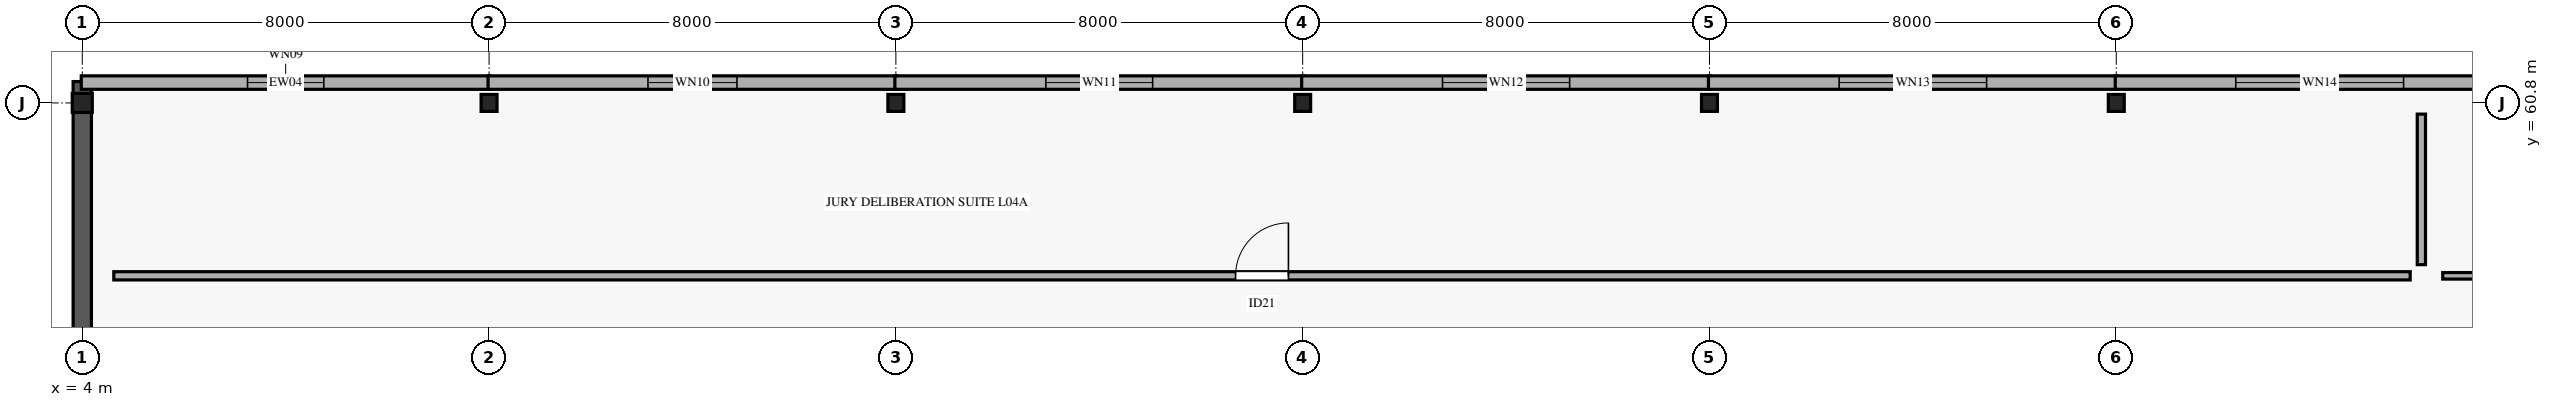
"""IFC4 building model, lengths in metres.
Left out: names, types, materials, properties, quantities, classifications, styles, units other than length and angle.
Written with IfcOpenShell. Run it as: python <this file> out.ifc"""

import sys

from ifc_helpers import new_model, si_unit, direction, frame, frame_2d, origin, origin_2d, place, context, subcontext, project, spatial, rectangle, i_section, extrude, element, fill, save


model = new_model("IFC4")
c1 = context("Model", 3, precision=1e-05, world=origin(), true_north=direction((0.0, 1.0)))
c2 = subcontext(c1, "Body", "Model", "MODEL_VIEW")
j1 = project(units=[si_unit("LENGTHUNIT", "METRE"), si_unit("PLANEANGLEUNIT", "RADIAN")], contexts=[c1])
p1 = place(None, origin())
s1 = spatial("IfcSite", under=j1, at=p1, CompositionType="ELEMENT")
p2 = place(p1, origin())
s2 = spatial("IfcBuilding", under=s1, at=p2, CompositionType="ELEMENT")
p3 = place(p2, frame((0.0, 0.0, 20.4)))
s3 = spatial("IfcBuildingStorey", under=s2, at=p3, CompositionType="ELEMENT", Elevation=20.4)
p4 = place(p3, frame((4.0, 60.8, 0.0), z_axis=(0.0, 0.0, 1.0), x_axis=(1.0, 0.0, 0.0)))
e1 = element("IfcColumn", 1, at=p4, inside=s3, PredefinedType="COLUMN", context=c2, shape_type="SweptSolid", body=[
    extrude(i_section(OverallWidth=0.394, OverallDepth=0.376, WebThickness=0.017, FlangeThickness=0.028, FilletRadius=0.015, at=origin_2d()), origin(), (0.0, 0.0, 1.0), 4.595),
])
for number, where, z_axis, x_axis in (
    (2, (12.0, 60.8, 0.0), (0.0, 0.0, 1.0), (1.0, 0.0, 0.0)),
    (3, (20.0, 60.8, 0.0), (0.0, 0.0, 1.0), (1.0, 0.0, 0.0)),
    (4, (28.0, 60.8, 0.0), (0.0, 0.0, 1.0), (1.0, 0.0, 0.0)),
    (5, (36.0, 60.8, 0.0), (0.0, 0.0, 1.0), (1.0, 0.0, 0.0)),
    (6, (44.0, 60.8, 0.0), (0.0, 0.0, 1.0), (1.0, 0.0, 0.0)),
):
    element("IfcColumn", number, at=place(p3, frame(where, z_axis=z_axis, x_axis=x_axis)), inside=s3, PredefinedType="COLUMN", context=c2, shape_type="SweptSolid", body=[
        extrude(i_section(OverallWidth=0.313, OverallDepth=0.333, WebThickness=0.018, FlangeThickness=0.028, FilletRadius=0.015, at=origin_2d()), origin(), (0.0, 0.0, 1.0), 4.595),
    ])
p5 = place(p3, frame((4.0, 53.18, 0.0), z_axis=(0.0, 0.0, 1.0), x_axis=(0.0, 1.0, 0.0)))
e7 = element("IfcWall", 7, at=p5, inside=s3, PredefinedType="STANDARD", context=c2, shape_type="SweptSolid", body=[
    extrude(rectangle(XDim=8.04, YDim=0.36, at=frame_2d((4.02, 0.0))), origin(), (0.0, 0.0, 1.0), 4.6),
])
p6 = place(p3, frame((3.98, 61.2, 0.0), z_axis=(0.0, 0.0, 1.0), x_axis=(1.0, 0.0, 0.0)))
e8 = element("IfcWall", 8, at=p6, inside=s3, PredefinedType="STANDARD", context=c2, shape_type="SweptSolid", body=[
    extrude(rectangle(XDim=8.04, YDim=0.265, at=frame_2d((4.02, 0.0))), origin(), (0.0, 0.0, 1.0), 3.66),
])
p7 = place(p6, frame((3.27, 0.0, 0.75)))
e9 = element("IfcOpeningElement", 9, at=p7, cuts=e8, PredefinedType="OPENING", context=c2, shape_type="SweptSolid", body=[
    extrude(rectangle(XDim=1.5, YDim=2.15, at=frame_2d((0.75, 1.075))), frame((0.0, 0.142, 0.0), z_axis=(0.0, -1.0, 0.0), x_axis=(1.0, 0.0, 0.0)), (0.0, 0.0, 1.0), 0.285),
])
p8 = place(p3, frame((11.98, 61.2, 0.0), z_axis=(0.0, 0.0, 1.0), x_axis=(1.0, 0.0, 0.0)))
e10 = element("IfcWall", 10, at=p8, inside=s3, PredefinedType="STANDARD", context=c2, shape_type="SweptSolid", body=[
    extrude(rectangle(XDim=8.04, YDim=0.265, at=frame_2d((4.02, 0.0))), origin(), (0.0, 0.0, 1.0), 3.66),
])
p9 = place(p8, frame((3.145, 0.0, 0.75)))
e11 = element("IfcOpeningElement", 11, at=p9, cuts=e10, PredefinedType="OPENING", context=c2, shape_type="SweptSolid", body=[
    extrude(rectangle(XDim=1.75, YDim=2.15, at=frame_2d((0.875, 1.075))), frame((0.0, 0.142, 0.0), z_axis=(0.0, -1.0, 0.0), x_axis=(1.0, 0.0, 0.0)), (0.0, 0.0, 1.0), 0.285),
])
p10 = place(p3, frame((19.98, 61.2, 0.0), z_axis=(0.0, 0.0, 1.0), x_axis=(1.0, 0.0, 0.0)))
e12 = element("IfcWall", 12, at=p10, inside=s3, PredefinedType="STANDARD", context=c2, shape_type="SweptSolid", body=[
    extrude(rectangle(XDim=8.04, YDim=0.265, at=frame_2d((4.02, 0.0))), origin(), (0.0, 0.0, 1.0), 3.66),
])
p11 = place(p10, frame((2.97, 0.0, 0.75)))
e13 = element("IfcOpeningElement", 13, at=p11, cuts=e12, PredefinedType="OPENING", context=c2, shape_type="SweptSolid", body=[
    extrude(rectangle(XDim=2.1, YDim=2.15, at=frame_2d((1.05, 1.075))), frame((0.0, 0.142, 0.0), z_axis=(0.0, -1.0, 0.0), x_axis=(1.0, 0.0, 0.0)), (0.0, 0.0, 1.0), 0.285),
])
p12 = place(p3, frame((27.98, 61.2, 0.0), z_axis=(0.0, 0.0, 1.0), x_axis=(1.0, 0.0, 0.0)))
e14 = element("IfcWall", 14, at=p12, inside=s3, PredefinedType="STANDARD", context=c2, shape_type="SweptSolid", body=[
    extrude(rectangle(XDim=8.04, YDim=0.265, at=frame_2d((4.02, 0.0))), origin(), (0.0, 0.0, 1.0), 3.66),
])
p13 = place(p12, frame((2.77, 0.0, 0.75)))
e15 = element("IfcOpeningElement", 15, at=p13, cuts=e14, PredefinedType="OPENING", context=c2, shape_type="SweptSolid", body=[
    extrude(rectangle(XDim=2.5, YDim=2.15, at=frame_2d((1.25, 1.075))), frame((0.0, 0.142, 0.0), z_axis=(0.0, -1.0, 0.0), x_axis=(1.0, 0.0, 0.0)), (0.0, 0.0, 1.0), 0.285),
])
p14 = place(p3, frame((35.98, 61.2, 0.0), z_axis=(0.0, 0.0, 1.0), x_axis=(1.0, 0.0, 0.0)))
e16 = element("IfcWall", 16, at=p14, inside=s3, PredefinedType="STANDARD", context=c2, shape_type="SweptSolid", body=[
    extrude(rectangle(XDim=8.04, YDim=0.265, at=frame_2d((4.02, 0.0))), origin(), (0.0, 0.0, 1.0), 3.66),
])
p15 = place(p14, frame((2.57, 0.0, 0.75)))
e17 = element("IfcOpeningElement", 17, at=p15, cuts=e16, PredefinedType="OPENING", context=c2, shape_type="SweptSolid", body=[
    extrude(rectangle(XDim=2.9, YDim=2.15, at=frame_2d((1.45, 1.075))), frame((0.0, 0.142, 0.0), z_axis=(0.0, -1.0, 0.0), x_axis=(1.0, 0.0, 0.0)), (0.0, 0.0, 1.0), 0.285),
])
p16 = place(p3, frame((43.98, 61.2, 0.0), z_axis=(0.0, 0.0, 1.0), x_axis=(1.0, 0.0, 0.0)))
e18 = element("IfcWall", 18, at=p16, inside=s3, PredefinedType="STANDARD", context=c2, shape_type="SweptSolid", body=[
    extrude(rectangle(XDim=8.04, YDim=0.265, at=frame_2d((4.02, 0.0))), origin(), (0.0, 0.0, 1.0), 3.66),
])
p17 = place(p16, frame((2.37, 0.0, 0.75)))
e19 = element("IfcOpeningElement", 19, at=p17, cuts=e18, PredefinedType="OPENING", context=c2, shape_type="SweptSolid", body=[
    extrude(rectangle(XDim=3.3, YDim=2.15, at=frame_2d((1.65, 1.075))), frame((0.0, 0.142, 0.0), z_axis=(0.0, -1.0, 0.0), x_axis=(1.0, 0.0, 0.0)), (0.0, 0.0, 1.0), 0.285),
])
p18 = place(p3, frame((4.62, 57.4, 0.0), z_axis=(0.0, 0.0, 1.0), x_axis=(1.0, 0.0, 0.0)))
e20 = element("IfcWall", 20, at=p18, inside=s3, PredefinedType="PARTITIONING", context=c2, shape_type="SweptSolid", body=[
    extrude(rectangle(XDim=45.16, YDim=0.162, at=frame_2d((22.58, 0.0))), origin(), (0.0, 0.0, 1.0), 3.45),
])
p19 = place(p18, frame((22.06, 0.0, 0.0)))
e21 = element("IfcOpeningElement", 21, at=p19, cuts=e20, PredefinedType="OPENING", context=c2, shape_type="SweptSolid", body=[
    extrude(rectangle(XDim=1.04, YDim=2.2, at=frame_2d((0.52, 1.1))), frame((0.0, 0.091, 0.0), z_axis=(0.0, -1.0, 0.0), x_axis=(1.0, 0.0, 0.0)), (0.0, 0.0, 1.0), 0.182),
])
p20 = place(p3, frame((50.0, 57.62, 0.0), z_axis=(0.0, 0.0, 1.0), x_axis=(0.0, 1.0, 0.0)))
e22 = element("IfcWall", 22, at=p20, inside=s3, PredefinedType="PARTITIONING", context=c2, shape_type="SweptSolid", body=[
    extrude(rectangle(XDim=2.96, YDim=0.162, at=frame_2d((1.48, 0.0))), origin(), (0.0, 0.0, 1.0), 3.45),
])
p21 = place(p3, frame((50.42, 57.4, 0.0), z_axis=(0.0, 0.0, 1.0), x_axis=(1.0, 0.0, 0.0)))
e23 = element("IfcWall", 23, at=p21, inside=s3, PredefinedType="PARTITIONING", context=c2, shape_type="SweptSolid", body=[
    extrude(rectangle(XDim=16.96, YDim=0.128, at=frame_2d((8.48, 0.0))), origin(), (0.0, 0.0, 1.0), 3.45),
])
p22 = place(p21, frame((8.01, 0.0, 0.0)))
e24 = element("IfcOpeningElement", 24, at=p22, cuts=e23, PredefinedType="OPENING", context=c2, shape_type="SweptSolid", body=[
    extrude(rectangle(XDim=0.94, YDim=2.2, at=frame_2d((0.47, 1.1))), frame((0.0, 0.074, 0.0), z_axis=(0.0, -1.0, 0.0), x_axis=(1.0, 0.0, 0.0)), (0.0, 0.0, 1.0), 0.148),
])
p23 = place(p7, origin())
e25 = element("IfcWindow", 25, at=p23, inside=s3, PartitioningType="SINGLE_PANEL", PredefinedType="WINDOW", context=c2, shape_type="SweptSolid", body=[
    extrude(rectangle(XDim=1.5, YDim=2.15, at=frame_2d((0.75, 1.075))), frame((0.0, 0.03, 0.0), z_axis=(0.0, -1.0, 0.0), x_axis=(1.0, 0.0, 0.0)), (0.0, 0.0, 1.0), 0.06),
])
fill(e9, e25)
p24 = place(p9, origin())
e26 = element("IfcWindow", 26, at=p24, inside=s3, PartitioningType="SINGLE_PANEL", PredefinedType="WINDOW", context=c2, shape_type="SweptSolid", body=[
    extrude(rectangle(XDim=1.75, YDim=2.15, at=frame_2d((0.875, 1.075))), frame((0.0, 0.03, 0.0), z_axis=(0.0, -1.0, 0.0), x_axis=(1.0, 0.0, 0.0)), (0.0, 0.0, 1.0), 0.06),
])
fill(e11, e26)
p25 = place(p11, origin())
e27 = element("IfcWindow", 27, at=p25, inside=s3, PartitioningType="SINGLE_PANEL", PredefinedType="WINDOW", context=c2, shape_type="SweptSolid", body=[
    extrude(rectangle(XDim=2.1, YDim=2.15, at=frame_2d((1.05, 1.075))), frame((0.0, 0.03, 0.0), z_axis=(0.0, -1.0, 0.0), x_axis=(1.0, 0.0, 0.0)), (0.0, 0.0, 1.0), 0.06),
])
fill(e13, e27)
p26 = place(p13, origin())
e28 = element("IfcWindow", 28, at=p26, inside=s3, PartitioningType="SINGLE_PANEL", PredefinedType="WINDOW", context=c2, shape_type="SweptSolid", body=[
    extrude(rectangle(XDim=2.5, YDim=2.15, at=frame_2d((1.25, 1.075))), frame((0.0, 0.03, 0.0), z_axis=(0.0, -1.0, 0.0), x_axis=(1.0, 0.0, 0.0)), (0.0, 0.0, 1.0), 0.06),
])
fill(e15, e28)
p27 = place(p15, origin())
e29 = element("IfcWindow", 29, at=p27, inside=s3, PartitioningType="SINGLE_PANEL", PredefinedType="WINDOW", context=c2, shape_type="SweptSolid", body=[
    extrude(rectangle(XDim=2.9, YDim=2.15, at=frame_2d((1.45, 1.075))), frame((0.0, 0.03, 0.0), z_axis=(0.0, -1.0, 0.0), x_axis=(1.0, 0.0, 0.0)), (0.0, 0.0, 1.0), 0.06),
])
fill(e17, e29)
p28 = place(p17, origin())
e30 = element("IfcWindow", 30, at=p28, inside=s3, PartitioningType="SINGLE_PANEL", PredefinedType="WINDOW", context=c2, shape_type="SweptSolid", body=[
    extrude(rectangle(XDim=3.3, YDim=2.15, at=frame_2d((1.65, 1.075))), frame((0.0, 0.03, 0.0), z_axis=(0.0, -1.0, 0.0), x_axis=(1.0, 0.0, 0.0)), (0.0, 0.0, 1.0), 0.06),
])
fill(e19, e30)
p29 = place(p19, origin())
e31 = element("IfcDoor", 31, at=p29, inside=s3, OperationType="SINGLE_SWING_RIGHT", PredefinedType="DOOR", context=c2, shape_type="SweptSolid", body=[
    extrude(rectangle(XDim=1.04, YDim=2.2, at=frame_2d((0.52, 1.1))), frame((0.0, 0.025, 0.0), z_axis=(0.0, -1.0, 0.0), x_axis=(1.0, 0.0, 0.0)), (0.0, 0.0, 1.0), 0.05),
])
fill(e21, e31)
save(model, sys.argv[1])
